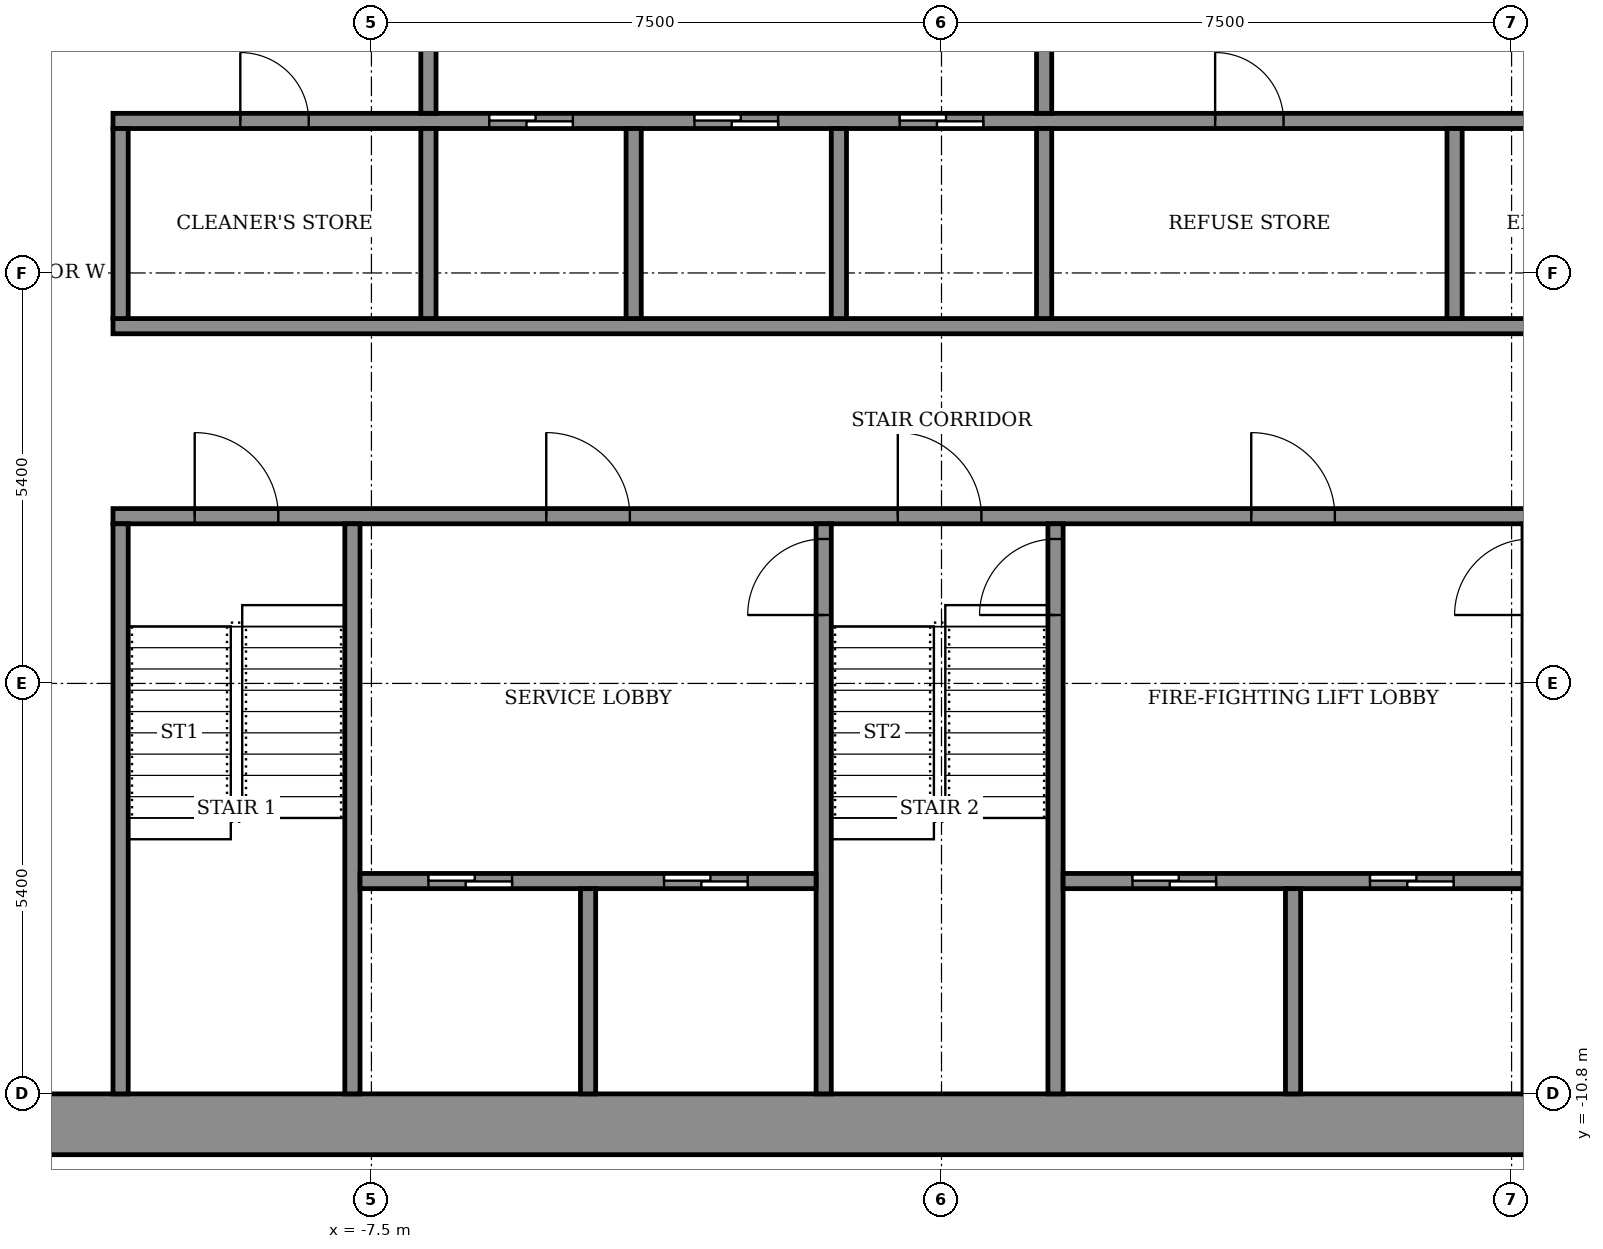
"""IFC4 building model, lengths in metres.
Left out: names, types, materials, properties, quantities, classifications, styles, units other than length and angle.
Written with IfcOpenShell. Run it as: python <this file> out.ifc"""

import sys

from ifc_helpers import new_model, si_unit, direction, frame, frame_2d, origin, place, context, subcontext, project, spatial, rectangle, extrude, element, fill, save


model = new_model("IFC4")
c1 = context("Model", 3, precision=1e-05, world=origin(), true_north=direction((0.0, 1.0)))
c2 = subcontext(c1, "Body", "Model", "MODEL_VIEW")
j1 = project(units=[si_unit("LENGTHUNIT", "METRE"), si_unit("PLANEANGLEUNIT", "RADIAN")], contexts=[c1])
p1 = place(None, origin())
s1 = spatial("IfcSite", under=j1, at=p1, CompositionType="ELEMENT")
p2 = place(p1, origin())
s2 = spatial("IfcBuilding", under=s1, at=p2, CompositionType="ELEMENT")
p3 = place(p2, frame((0.0, 0.0, 241.9)))
s3 = spatial("IfcBuildingStorey", under=s2, at=p3, CompositionType="ELEMENT", Elevation=241.9)
p4 = place(p3, frame((-14.6, -11.2, 0.0), z_axis=(0.0, 0.0, 1.0), x_axis=(1.0, 0.0, 0.0)))
e1 = element("IfcWall", 1, at=p4, inside=s3, PredefinedType="SHEAR", context=c2, shape_type="SweptSolid", body=[
    extrude(rectangle(XDim=29.2, YDim=0.8, at=frame_2d((14.6, 0.0))), origin(), (0.0, 0.0, 1.0), 3.6),
])
p5 = place(p3, frame((-10.9, -3.2, 0.0), z_axis=(0.0, 0.0, 1.0), x_axis=(1.0, 0.0, 0.0)))
e2 = element("IfcWall", 2, at=p5, inside=s3, PredefinedType="SHEAR", context=c2, shape_type="SweptSolid", body=[
    extrude(rectangle(XDim=21.8, YDim=0.2, at=frame_2d((10.9, 0.0))), origin(), (0.0, 0.0, 1.0), 3.05),
])
p6 = place(p5, frame((1.075, 0.0, 0.0)))
e3 = element("IfcOpeningElement", 3, at=p6, cuts=e2, PredefinedType="OPENING", context=c2, shape_type="SweptSolid", body=[
    extrude(rectangle(XDim=1.1, YDim=2.1, at=frame_2d((0.55, 1.05))), frame((0.0, 0.11, 0.0), z_axis=(0.0, -1.0, 0.0), x_axis=(1.0, 0.0, 0.0)), (0.0, 0.0, 1.0), 0.22),
])
p7 = place(p5, frame((10.325, 0.0, 0.0)))
e4 = element("IfcOpeningElement", 4, at=p7, cuts=e2, PredefinedType="OPENING", context=c2, shape_type="SweptSolid", body=[
    extrude(rectangle(XDim=1.1, YDim=2.1, at=frame_2d((0.55, 1.05))), frame((0.0, 0.11, 0.0), z_axis=(0.0, -1.0, 0.0), x_axis=(1.0, 0.0, 0.0)), (0.0, 0.0, 1.0), 0.22),
])
p8 = place(p5, frame((19.625, 0.0, 0.0)))
e5 = element("IfcOpeningElement", 5, at=p8, cuts=e2, PredefinedType="OPENING", context=c2, shape_type="SweptSolid", body=[
    extrude(rectangle(XDim=1.1, YDim=2.1, at=frame_2d((0.55, 1.05))), frame((0.0, 0.11, 0.0), z_axis=(0.0, -1.0, 0.0), x_axis=(1.0, 0.0, 0.0)), (0.0, 0.0, 1.0), 0.22),
])
p9 = place(p5, frame((5.7, 0.0, 0.0)))
e6 = element("IfcOpeningElement", 6, at=p9, cuts=e2, PredefinedType="OPENING", context=c2, shape_type="SweptSolid", body=[
    extrude(rectangle(XDim=1.1, YDim=2.1, at=frame_2d((0.55, 1.05))), frame((0.0, 0.11, 0.0), z_axis=(0.0, -1.0, 0.0), x_axis=(1.0, 0.0, 0.0)), (0.0, 0.0, 1.0), 0.22),
])
p10 = place(p5, frame((14.975, 0.0, 0.0)))
e7 = element("IfcOpeningElement", 7, at=p10, cuts=e2, PredefinedType="OPENING", context=c2, shape_type="SweptSolid", body=[
    extrude(rectangle(XDim=1.1, YDim=2.1, at=frame_2d((0.55, 1.05))), frame((0.0, 0.11, 0.0), z_axis=(0.0, -1.0, 0.0), x_axis=(1.0, 0.0, 0.0)), (0.0, 0.0, 1.0), 0.22),
])
p11 = place(p3, frame((-10.9, -0.7, 0.0), z_axis=(0.0, 0.0, 1.0), x_axis=(1.0, 0.0, 0.0)))
e8 = element("IfcWall", 8, at=p11, inside=s3, PredefinedType="SHEAR", context=c2, shape_type="SweptSolid", body=[
    extrude(rectangle(XDim=21.8, YDim=0.2, at=frame_2d((10.9, 0.0))), origin(), (0.0, 0.0, 1.0), 3.05),
])
p12 = place(p3, frame((-10.9, 2.0, 0.0), z_axis=(0.0, 0.0, 1.0), x_axis=(1.0, 0.0, 0.0)))
e9 = element("IfcWall", 9, at=p12, inside=s3, PredefinedType="SHEAR", context=c2, shape_type="SweptSolid", body=[
    extrude(rectangle(XDim=21.8, YDim=0.2, at=frame_2d((10.9, 0.0))), origin(), (0.0, 0.0, 1.0), 3.05),
])
p13 = place(p12, frame((4.95, 0.0, 0.0)))
e10 = element("IfcOpeningElement", 10, at=p13, cuts=e9, PredefinedType="OPENING", context=c2, shape_type="SweptSolid", body=[
    extrude(rectangle(XDim=1.1, YDim=2.1, at=frame_2d((0.55, 1.05))), frame((0.0, 0.11, 0.0), z_axis=(0.0, -1.0, 0.0), x_axis=(1.0, 0.0, 0.0)), (0.0, 0.0, 1.0), 0.22),
])
p14 = place(p12, frame((7.65, 0.0, 0.0)))
e11 = element("IfcOpeningElement", 11, at=p14, cuts=e9, PredefinedType="OPENING", context=c2, shape_type="SweptSolid", body=[
    extrude(rectangle(XDim=1.1, YDim=2.1, at=frame_2d((0.55, 1.05))), frame((0.0, 0.11, 0.0), z_axis=(0.0, -1.0, 0.0), x_axis=(1.0, 0.0, 0.0)), (0.0, 0.0, 1.0), 0.22),
])
p15 = place(p12, frame((10.35, 0.0, 0.0)))
e12 = element("IfcOpeningElement", 12, at=p15, cuts=e9, PredefinedType="OPENING", context=c2, shape_type="SweptSolid", body=[
    extrude(rectangle(XDim=1.1, YDim=2.1, at=frame_2d((0.55, 1.05))), frame((0.0, 0.11, 0.0), z_axis=(0.0, -1.0, 0.0), x_axis=(1.0, 0.0, 0.0)), (0.0, 0.0, 1.0), 0.22),
])
p16 = place(p12, frame((1.675, 0.0, 0.0)))
e13 = element("IfcOpeningElement", 13, at=p16, cuts=e9, PredefinedType="OPENING", context=c2, shape_type="SweptSolid", body=[
    extrude(rectangle(XDim=0.9, YDim=2.1, at=frame_2d((0.45, 1.05))), frame((0.0, 0.11, 0.0), z_axis=(0.0, -1.0, 0.0), x_axis=(1.0, 0.0, 0.0)), (0.0, 0.0, 1.0), 0.22),
])
p17 = place(p12, frame((14.5, 0.0, 0.0)))
e14 = element("IfcOpeningElement", 14, at=p17, cuts=e9, PredefinedType="OPENING", context=c2, shape_type="SweptSolid", body=[
    extrude(rectangle(XDim=0.9, YDim=2.1, at=frame_2d((0.45, 1.05))), frame((0.0, 0.11, 0.0), z_axis=(0.0, -1.0, 0.0), x_axis=(1.0, 0.0, 0.0)), (0.0, 0.0, 1.0), 0.22),
])
p18 = place(p12, frame((19.225, 0.0, 0.0)))
e15 = element("IfcOpeningElement", 15, at=p18, cuts=e9, PredefinedType="OPENING", context=c2, shape_type="SweptSolid", body=[
    extrude(rectangle(XDim=0.9, YDim=2.1, at=frame_2d((0.45, 1.05))), frame((0.0, 0.11, 0.0), z_axis=(0.0, -1.0, 0.0), x_axis=(1.0, 0.0, 0.0)), (0.0, 0.0, 1.0), 0.22),
])
for number, where, z_axis, x_axis in (
    (16, (-10.8, -10.8, 0.0), (0.0, 0.0, 1.0), (0.0, 1.0, 0.0)),
    (17, (-7.75, -10.8, 0.0), (0.0, 0.0, 1.0), (0.0, 1.0, 0.0)),
):
    element("IfcWall", number, at=place(p3, frame(where, z_axis=z_axis, x_axis=x_axis)), inside=s3, PredefinedType="SHEAR", context=c2, shape_type="SweptSolid", body=[
        extrude(rectangle(XDim=7.5, YDim=0.2, at=frame_2d((3.75, 0.0))), origin(), (0.0, 0.0, 1.0), 3.05),
    ])
p19 = place(p3, frame((-1.55, -10.8, 0.0), z_axis=(0.0, 0.0, 1.0), x_axis=(0.0, 1.0, 0.0)))
e18 = element("IfcWall", 18, at=p19, inside=s3, PredefinedType="SHEAR", context=c2, shape_type="SweptSolid", body=[
    extrude(rectangle(XDim=7.5, YDim=0.2, at=frame_2d((3.75, 0.0))), origin(), (0.0, 0.0, 1.0), 3.05),
])
p20 = place(p19, frame((6.3, 0.0, 0.0)))
e19 = element("IfcOpeningElement", 19, at=p20, cuts=e18, PredefinedType="OPENING", context=c2, shape_type="SweptSolid", body=[
    extrude(rectangle(XDim=1.0, YDim=2.1, at=frame_2d((0.5, 1.05))), frame((0.0, 0.11, 0.0), z_axis=(0.0, -1.0, 0.0), x_axis=(1.0, 0.0, 0.0)), (0.0, 0.0, 1.0), 0.22),
])
p21 = place(p3, frame((1.5, -10.8, 0.0), z_axis=(0.0, 0.0, 1.0), x_axis=(0.0, 1.0, 0.0)))
e20 = element("IfcWall", 20, at=p21, inside=s3, PredefinedType="SHEAR", context=c2, shape_type="SweptSolid", body=[
    extrude(rectangle(XDim=7.5, YDim=0.2, at=frame_2d((3.75, 0.0))), origin(), (0.0, 0.0, 1.0), 3.05),
])
p22 = place(p21, frame((6.3, 0.0, 0.0)))
e21 = element("IfcOpeningElement", 21, at=p22, cuts=e20, PredefinedType="OPENING", context=c2, shape_type="SweptSolid", body=[
    extrude(rectangle(XDim=1.0, YDim=2.1, at=frame_2d((0.5, 1.05))), frame((0.0, 0.11, 0.0), z_axis=(0.0, -1.0, 0.0), x_axis=(1.0, 0.0, 0.0)), (0.0, 0.0, 1.0), 0.22),
])
p23 = place(p3, frame((-7.65, -8.0, 0.0), z_axis=(0.0, 0.0, 1.0), x_axis=(1.0, 0.0, 0.0)))
e22 = element("IfcWall", 22, at=p23, inside=s3, PredefinedType="SHEAR", context=c2, shape_type="SweptSolid", body=[
    extrude(rectangle(XDim=6.0, YDim=0.2, at=frame_2d((3.0, 0.0))), origin(), (0.0, 0.0, 1.0), 3.05),
])
p24 = place(p23, frame((0.9, 0.0, 0.0)))
e23 = element("IfcOpeningElement", 23, at=p24, cuts=e22, PredefinedType="OPENING", context=c2, shape_type="SweptSolid", body=[
    extrude(rectangle(XDim=1.1, YDim=2.1, at=frame_2d((0.55, 1.05))), frame((0.0, 0.11, 0.0), z_axis=(0.0, -1.0, 0.0), x_axis=(1.0, 0.0, 0.0)), (0.0, 0.0, 1.0), 0.22),
])
p25 = place(p23, frame((4.0, 0.0, 0.0)))
e24 = element("IfcOpeningElement", 24, at=p25, cuts=e22, PredefinedType="OPENING", context=c2, shape_type="SweptSolid", body=[
    extrude(rectangle(XDim=1.1, YDim=2.1, at=frame_2d((0.55, 1.05))), frame((0.0, 0.11, 0.0), z_axis=(0.0, -1.0, 0.0), x_axis=(1.0, 0.0, 0.0)), (0.0, 0.0, 1.0), 0.22),
])
p26 = place(p3, frame((-4.65, -10.8, 0.0), z_axis=(0.0, 0.0, 1.0), x_axis=(0.0, 1.0, 0.0)))
e25 = element("IfcWall", 25, at=p26, inside=s3, PredefinedType="SHEAR", context=c2, shape_type="SweptSolid", body=[
    extrude(rectangle(XDim=2.7, YDim=0.2, at=frame_2d((1.35, 0.0))), origin(), (0.0, 0.0, 1.0), 3.05),
])
p27 = place(p3, frame((1.6, -8.0, 0.0), z_axis=(0.0, 0.0, 1.0), x_axis=(1.0, 0.0, 0.0)))
e26 = element("IfcWall", 26, at=p27, inside=s3, PredefinedType="SHEAR", context=c2, shape_type="SweptSolid", body=[
    extrude(rectangle(XDim=6.05, YDim=0.2, at=frame_2d((3.025, 0.0))), origin(), (0.0, 0.0, 1.0), 3.05),
])
p28 = place(p27, frame((0.913, 0.0, 0.0)))
e27 = element("IfcOpeningElement", 27, at=p28, cuts=e26, PredefinedType="OPENING", context=c2, shape_type="SweptSolid", body=[
    extrude(rectangle(XDim=1.1, YDim=2.1, at=frame_2d((0.55, 1.05))), frame((0.0, 0.11, 0.0), z_axis=(0.0, -1.0, 0.0), x_axis=(1.0, 0.0, 0.0)), (0.0, 0.0, 1.0), 0.22),
])
p29 = place(p27, frame((4.038, 0.0, 0.0)))
e28 = element("IfcOpeningElement", 28, at=p29, cuts=e26, PredefinedType="OPENING", context=c2, shape_type="SweptSolid", body=[
    extrude(rectangle(XDim=1.1, YDim=2.1, at=frame_2d((0.55, 1.05))), frame((0.0, 0.11, 0.0), z_axis=(0.0, -1.0, 0.0), x_axis=(1.0, 0.0, 0.0)), (0.0, 0.0, 1.0), 0.22),
])
p30 = place(p3, frame((4.625, -10.8, 0.0), z_axis=(0.0, 0.0, 1.0), x_axis=(0.0, 1.0, 0.0)))
e29 = element("IfcWall", 29, at=p30, inside=s3, PredefinedType="SHEAR", context=c2, shape_type="SweptSolid", body=[
    extrude(rectangle(XDim=2.7, YDim=0.2, at=frame_2d((1.35, 0.0))), origin(), (0.0, 0.0, 1.0), 3.05),
])
p31 = place(p3, frame((-10.8, -0.6, 0.0), z_axis=(0.0, 0.0, 1.0), x_axis=(0.0, 1.0, 0.0)))
e30 = element("IfcWall", 30, at=p31, inside=s3, PredefinedType="STANDARD", context=c2, shape_type="SweptSolid", body=[
    extrude(rectangle(XDim=2.5, YDim=0.2, at=frame_2d((1.25, 0.0))), origin(), (0.0, 0.0, 1.0), 3.05),
])
for number, where, z_axis, x_axis in (
    (31, (-6.75, -0.6, 0.0), (0.0, 0.0, 1.0), (0.0, 1.0, 0.0)),
    (32, (-4.05, -0.6, 0.0), (0.0, 0.0, 1.0), (0.0, 1.0, 0.0)),
    (33, (-1.35, -0.6, 0.0), (0.0, 0.0, 1.0), (0.0, 1.0, 0.0)),
    (34, (1.35, -0.6, 0.0), (0.0, 0.0, 1.0), (0.0, 1.0, 0.0)),
):
    element("IfcWall", number, at=place(p3, frame(where, z_axis=z_axis, x_axis=x_axis)), inside=s3, PredefinedType="SHEAR", context=c2, shape_type="SweptSolid", body=[
        extrude(rectangle(XDim=2.5, YDim=0.2, at=frame_2d((1.25, 0.0))), origin(), (0.0, 0.0, 1.0), 3.05),
    ])
p32 = place(p3, frame((6.75, -0.6, 0.0), z_axis=(0.0, 0.0, 1.0), x_axis=(0.0, 1.0, 0.0)))
e35 = element("IfcWall", 35, at=p32, inside=s3, PredefinedType="STANDARD", context=c2, shape_type="SweptSolid", body=[
    extrude(rectangle(XDim=2.5, YDim=0.2, at=frame_2d((1.25, 0.0))), origin(), (0.0, 0.0, 1.0), 3.05),
])
p33 = place(p3, frame((-6.75, 2.1, 0.0), z_axis=(0.0, 0.0, 1.0), x_axis=(0.0, 1.0, 0.0)))
e36 = element("IfcWall", 36, at=p33, inside=s3, PredefinedType="STANDARD", context=c2, shape_type="SweptSolid", body=[
    extrude(rectangle(XDim=5.9, YDim=0.2, at=frame_2d((2.95, 0.0))), origin(), (0.0, 0.0, 1.0), 3.05),
])
p34 = place(p33, frame((2.35, 0.0, 0.0)))
e37 = element("IfcOpeningElement", 37, at=p34, cuts=e36, PredefinedType="OPENING", context=c2, shape_type="SweptSolid", body=[
    extrude(rectangle(XDim=1.2, YDim=2.1, at=frame_2d((0.6, 1.05))), frame((0.0, 0.11, 0.0), z_axis=(0.0, -1.0, 0.0), x_axis=(1.0, 0.0, 0.0)), (0.0, 0.0, 1.0), 0.22),
])
p35 = place(p3, frame((1.35, 2.1, 0.0), z_axis=(0.0, 0.0, 1.0), x_axis=(0.0, 1.0, 0.0)))
e38 = element("IfcWall", 38, at=p35, inside=s3, PredefinedType="STANDARD", context=c2, shape_type="SweptSolid", body=[
    extrude(rectangle(XDim=5.9, YDim=0.2, at=frame_2d((2.95, 0.0))), origin(), (0.0, 0.0, 1.0), 3.05),
])
p36 = place(p35, frame((2.35, 0.0, 0.0)))
e39 = element("IfcOpeningElement", 39, at=p36, cuts=e38, PredefinedType="OPENING", context=c2, shape_type="SweptSolid", body=[
    extrude(rectangle(XDim=1.2, YDim=2.1, at=frame_2d((0.6, 1.05))), frame((0.0, 0.11, 0.0), z_axis=(0.0, -1.0, 0.0), x_axis=(1.0, 0.0, 0.0)), (0.0, 0.0, 1.0), 0.22),
])
p37 = place(p13, origin())
e40 = element("IfcDoor", 40, at=p37, inside=s3, OperationType="SLIDING_TO_LEFT", PredefinedType="DOOR", context=c2, shape_type="SweptSolid", body=[
    extrude(rectangle(XDim=1.1, YDim=2.1, at=frame_2d((0.55, 1.05))), frame((0.0, 0.025, 0.0), z_axis=(0.0, -1.0, 0.0), x_axis=(1.0, 0.0, 0.0)), (0.0, 0.0, 1.0), 0.05),
])
fill(e10, e40)
p38 = place(p14, origin())
e41 = element("IfcDoor", 41, at=p38, inside=s3, OperationType="SLIDING_TO_LEFT", PredefinedType="DOOR", context=c2, shape_type="SweptSolid", body=[
    extrude(rectangle(XDim=1.1, YDim=2.1, at=frame_2d((0.55, 1.05))), frame((0.0, 0.025, 0.0), z_axis=(0.0, -1.0, 0.0), x_axis=(1.0, 0.0, 0.0)), (0.0, 0.0, 1.0), 0.05),
])
fill(e11, e41)
p39 = place(p15, origin())
e42 = element("IfcDoor", 42, at=p39, inside=s3, OperationType="SLIDING_TO_LEFT", PredefinedType="DOOR", context=c2, shape_type="SweptSolid", body=[
    extrude(rectangle(XDim=1.1, YDim=2.1, at=frame_2d((0.55, 1.05))), frame((0.0, 0.025, 0.0), z_axis=(0.0, -1.0, 0.0), x_axis=(1.0, 0.0, 0.0)), (0.0, 0.0, 1.0), 0.05),
])
fill(e12, e42)
p40 = place(p16, origin())
e43 = element("IfcDoor", 43, at=p40, inside=s3, OperationType="SINGLE_SWING_RIGHT", PredefinedType="DOOR", context=c2, shape_type="SweptSolid", body=[
    extrude(rectangle(XDim=0.9, YDim=2.1, at=frame_2d((0.45, 1.05))), frame((0.0, 0.025, 0.0), z_axis=(0.0, -1.0, 0.0), x_axis=(1.0, 0.0, 0.0)), (0.0, 0.0, 1.0), 0.05),
])
fill(e13, e43)
p41 = place(p17, origin())
e44 = element("IfcDoor", 44, at=p41, inside=s3, OperationType="SINGLE_SWING_RIGHT", PredefinedType="DOOR", context=c2, shape_type="SweptSolid", body=[
    extrude(rectangle(XDim=0.9, YDim=2.1, at=frame_2d((0.45, 1.05))), frame((0.0, 0.025, 0.0), z_axis=(0.0, -1.0, 0.0), x_axis=(1.0, 0.0, 0.0)), (0.0, 0.0, 1.0), 0.05),
])
fill(e14, e44)
p42 = place(p28, origin())
e45 = element("IfcDoor", 45, at=p42, inside=s3, OperationType="SLIDING_TO_LEFT", PredefinedType="DOOR", context=c2, shape_type="SweptSolid", body=[
    extrude(rectangle(XDim=1.1, YDim=2.1, at=frame_2d((0.55, 1.05))), frame((0.0, 0.025, 0.0), z_axis=(0.0, -1.0, 0.0), x_axis=(1.0, 0.0, 0.0)), (0.0, 0.0, 1.0), 0.05),
])
fill(e27, e45)
p43 = place(p24, origin())
e46 = element("IfcDoor", 46, at=p43, inside=s3, OperationType="SLIDING_TO_LEFT", PredefinedType="DOOR", context=c2, shape_type="SweptSolid", body=[
    extrude(rectangle(XDim=1.1, YDim=2.1, at=frame_2d((0.55, 1.05))), frame((0.0, 0.025, 0.0), z_axis=(0.0, -1.0, 0.0), x_axis=(1.0, 0.0, 0.0)), (0.0, 0.0, 1.0), 0.05),
])
fill(e23, e46)
p44 = place(p29, origin())
e47 = element("IfcDoor", 47, at=p44, inside=s3, OperationType="SLIDING_TO_LEFT", PredefinedType="DOOR", context=c2, shape_type="SweptSolid", body=[
    extrude(rectangle(XDim=1.1, YDim=2.1, at=frame_2d((0.55, 1.05))), frame((0.0, 0.025, 0.0), z_axis=(0.0, -1.0, 0.0), x_axis=(1.0, 0.0, 0.0)), (0.0, 0.0, 1.0), 0.05),
])
fill(e28, e47)
p45 = place(p25, origin())
e48 = element("IfcDoor", 48, at=p45, inside=s3, OperationType="SLIDING_TO_LEFT", PredefinedType="DOOR", context=c2, shape_type="SweptSolid", body=[
    extrude(rectangle(XDim=1.1, YDim=2.1, at=frame_2d((0.55, 1.05))), frame((0.0, 0.025, 0.0), z_axis=(0.0, -1.0, 0.0), x_axis=(1.0, 0.0, 0.0)), (0.0, 0.0, 1.0), 0.05),
])
fill(e24, e48)
p46 = place(p6, origin())
e49 = element("IfcDoor", 49, at=p46, inside=s3, OperationType="SINGLE_SWING_RIGHT", PredefinedType="DOOR", context=c2, shape_type="SweptSolid", body=[
    extrude(rectangle(XDim=1.1, YDim=2.1, at=frame_2d((0.55, 1.05))), frame((0.0, 0.025, 0.0), z_axis=(0.0, -1.0, 0.0), x_axis=(1.0, 0.0, 0.0)), (0.0, 0.0, 1.0), 0.05),
])
fill(e3, e49)
p47 = place(p7, origin())
e50 = element("IfcDoor", 50, at=p47, inside=s3, OperationType="SINGLE_SWING_RIGHT", PredefinedType="DOOR", context=c2, shape_type="SweptSolid", body=[
    extrude(rectangle(XDim=1.1, YDim=2.1, at=frame_2d((0.55, 1.05))), frame((0.0, 0.025, 0.0), z_axis=(0.0, -1.0, 0.0), x_axis=(1.0, 0.0, 0.0)), (0.0, 0.0, 1.0), 0.05),
])
fill(e4, e50)
p48 = place(p9, origin())
e51 = element("IfcDoor", 51, at=p48, inside=s3, OperationType="SINGLE_SWING_LEFT", PredefinedType="DOOR", context=c2, shape_type="SweptSolid", body=[
    extrude(rectangle(XDim=1.1, YDim=2.1, at=frame_2d((0.55, 1.05))), frame((0.0, 0.025, 0.0), z_axis=(0.0, -1.0, 0.0), x_axis=(1.0, 0.0, 0.0)), (0.0, 0.0, 1.0), 0.05),
])
fill(e6, e51)
p49 = place(p10, origin())
e52 = element("IfcDoor", 52, at=p49, inside=s3, OperationType="SINGLE_SWING_LEFT", PredefinedType="DOOR", context=c2, shape_type="SweptSolid", body=[
    extrude(rectangle(XDim=1.1, YDim=2.1, at=frame_2d((0.55, 1.05))), frame((0.0, 0.025, 0.0), z_axis=(0.0, -1.0, 0.0), x_axis=(1.0, 0.0, 0.0)), (0.0, 0.0, 1.0), 0.05),
])
fill(e7, e52)
p50 = place(p20, origin())
e53 = element("IfcDoor", 53, at=p50, inside=s3, OperationType="SINGLE_SWING_RIGHT", PredefinedType="DOOR", context=c2, shape_type="SweptSolid", body=[
    extrude(rectangle(XDim=1.0, YDim=2.1, at=frame_2d((0.5, 1.05))), frame((0.0, 0.025, 0.0), z_axis=(0.0, -1.0, 0.0), x_axis=(1.0, 0.0, 0.0)), (0.0, 0.0, 1.0), 0.05),
])
fill(e19, e53)
p51 = place(p22, origin())
e54 = element("IfcDoor", 54, at=p51, inside=s3, OperationType="SINGLE_SWING_RIGHT", PredefinedType="DOOR", context=c2, shape_type="SweptSolid", body=[
    extrude(rectangle(XDim=1.0, YDim=2.1, at=frame_2d((0.5, 1.05))), frame((0.0, 0.025, 0.0), z_axis=(0.0, -1.0, 0.0), x_axis=(1.0, 0.0, 0.0)), (0.0, 0.0, 1.0), 0.05),
])
fill(e21, e54)
save(model, sys.argv[1])
